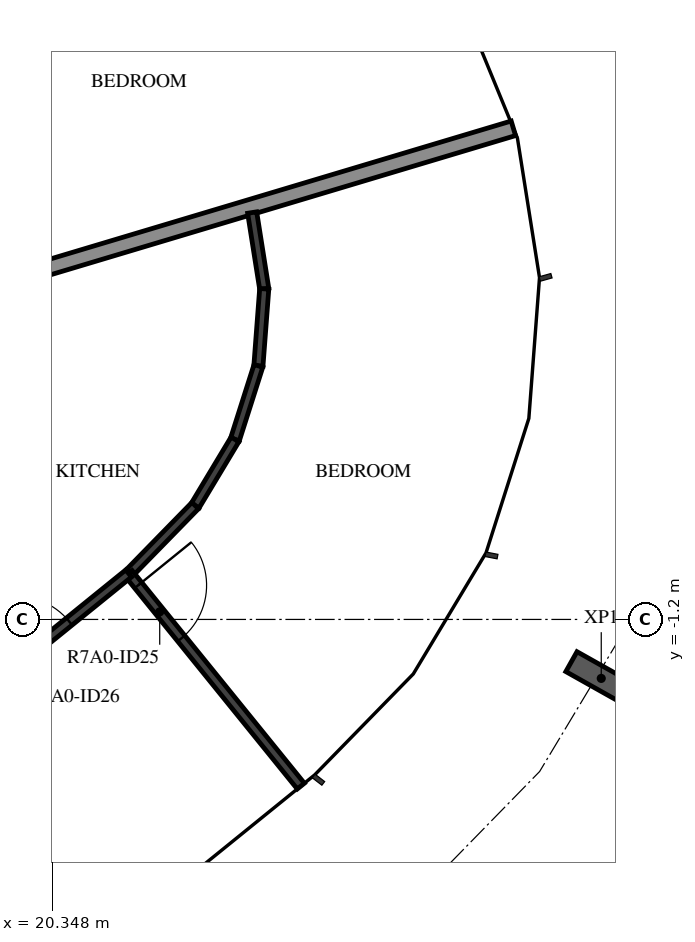
"""IFC4 building model, lengths in metres.
Left out: names, types, materials, properties, quantities, classifications, styles, units other than length and angle.
Written with IfcOpenShell. Run it as: python <this file> out.ifc"""

import sys

from ifc_helpers import new_model, si_unit, direction, frame, frame_2d, origin, origin_2d, place, context, subcontext, project, spatial, rectangle, i_section, extrude, element, fill, save


model = new_model("IFC4")
c1 = context("Model", 3, precision=1e-05, world=origin(), true_north=direction((0.0, 1.0)))
c2 = subcontext(c1, "Body", "Model", "MODEL_VIEW")
j1 = project(units=[si_unit("LENGTHUNIT", "METRE"), si_unit("PLANEANGLEUNIT", "RADIAN")], contexts=[c1])
p1 = place(None, origin())
s1 = spatial("IfcSite", under=j1, at=p1, CompositionType="ELEMENT")
p2 = place(p1, origin())
s2 = spatial("IfcBuilding", under=s1, at=p2, CompositionType="ELEMENT")
p3 = place(p2, frame((0.0, 0.0, 270.4)))
s3 = spatial("IfcBuildingStorey", under=s2, at=p3, CompositionType="ELEMENT", Elevation=270.4)
p4 = place(p3, frame((27.565, -1.976, -0.38), z_axis=(0.0, 0.0, 1.0), x_axis=(-0.489802299008, -0.871833532211, 0.0)))
e1 = element("IfcColumn", 1, at=p4, inside=s3, PredefinedType="COLUMN", context=c2, shape_type="SweptSolid", body=[
    extrude(i_section(OverallWidth=0.3, OverallDepth=0.9, WebThickness=0.019, FlangeThickness=0.035, FilletRadius=0.03, at=origin_2d()), origin(), (0.0, 0.0, 1.0), 3.5),
])
p5 = place(p3, frame((20.209, 3.405, 0.0), z_axis=(0.0, 0.0, 1.0), x_axis=(0.957991224208, 0.286797514529, 0.0)))
e2 = element("IfcWall", 2, at=p5, inside=s3, PredefinedType="STANDARD", context=c2, shape_type="SweptSolid", body=[
    extrude(rectangle(XDim=6.471, YDim=0.2, at=frame_2d((3.236, 0.0))), origin(), (0.0, 0.0, 1.0), 2.73),
])
p6 = place(p3, frame((22.972, 4.153, 0.0), z_axis=(0.0, 0.0, 1.0), x_axis=(0.156209385929, -0.987723963336, 0.0)))
e3 = element("IfcWall", 3, at=p6, inside=s3, PredefinedType="PARTITIONING", context=c2, shape_type="SweptSolid", body=[
    extrude(rectangle(XDim=1.016, YDim=0.12, at=frame_2d((0.508, 0.0))), origin(), (0.0, 0.0, 1.0), 3.12),
])
p7 = place(p3, frame((23.131, 3.149, 0.0), z_axis=(0.0, 0.0, 1.0), x_axis=(-0.075446997935, -0.99714981347, 0.0)))
e4 = element("IfcWall", 4, at=p7, inside=s3, PredefinedType="PARTITIONING", context=c2, shape_type="SweptSolid", body=[
    extrude(rectangle(XDim=1.016, YDim=0.12, at=frame_2d((0.508, 0.0))), origin(), (0.0, 0.0, 1.0), 3.12),
])
p8 = place(p3, frame((23.054, 2.136, 0.0), z_axis=(0.0, 0.0, 1.0), x_axis=(-0.303511129679, -0.952827893253, 0.0)))
e5 = element("IfcWall", 5, at=p8, inside=s3, PredefinedType="PARTITIONING", context=c2, shape_type="SweptSolid", body=[
    extrude(rectangle(XDim=1.016, YDim=0.12, at=frame_2d((0.508, 0.0))), origin(), (0.0, 0.0, 1.0), 3.12),
])
p9 = place(p3, frame((22.746, 1.168, 0.0), z_axis=(0.0, 0.0, 1.0), x_axis=(-0.515096534995, -0.857132171626, 0.0)))
e6 = element("IfcWall", 6, at=p9, inside=s3, PredefinedType="PARTITIONING", context=c2, shape_type="SweptSolid", body=[
    extrude(rectangle(XDim=1.016, YDim=0.12, at=frame_2d((0.508, 0.0))), origin(), (0.0, 0.0, 1.0), 3.12),
])
p10 = place(p3, frame((22.223, 0.298, 0.0), z_axis=(0.0, 0.0, 1.0), x_axis=(-0.69880109182, -0.715316037896, 0.0)))
e7 = element("IfcWall", 7, at=p10, inside=s3, PredefinedType="PARTITIONING", context=c2, shape_type="SweptSolid", body=[
    extrude(rectangle(XDim=1.227, YDim=0.12, at=frame_2d((0.614, 0.0))), origin(), (0.0, 0.0, 1.0), 3.12),
])
p11 = place(p3, frame((21.347, -0.595, 0.0), z_axis=(0.0, 0.0, 1.0), x_axis=(0.62934843781, -0.7771232488, 0.0)))
e8 = element("IfcWall", 8, at=p11, inside=s3, PredefinedType="PARTITIONING", context=c2, shape_type="SweptSolid", body=[
    extrude(rectangle(XDim=3.6, YDim=0.12, at=frame_2d((1.8, 0.0))), origin(), (0.0, 0.0, 1.0), 3.12),
])
p12 = place(p11, frame((0.2, 0.0, 0.0)))
e9 = element("IfcOpeningElement", 9, at=p12, cuts=e8, PredefinedType="OPENING", context=c2, shape_type="SweptSolid", body=[
    extrude(rectangle(XDim=0.9, YDim=2.1, at=frame_2d((0.45, 1.05))), frame((0.0, 0.07, 0.0), z_axis=(0.0, -1.0, 0.0), x_axis=(1.0, 0.0, 0.0)), (0.0, 0.0, 1.0), 0.14),
])
p13 = place(p3, frame((19.4, -2.172, 0.0), z_axis=(0.0, 0.0, 1.0), x_axis=(0.777147279935, 0.629318762862, 0.0)))
e10 = element("IfcWall", 10, at=p13, inside=s3, PredefinedType="PARTITIONING", context=c2, shape_type="SweptSolid", body=[
    extrude(rectangle(XDim=2.505, YDim=0.12, at=frame_2d((1.253, 0.0))), origin(), (0.0, 0.0, 1.0), 3.12),
])
p14 = place(p13, frame((0.6, 0.0, 0.0)))
e11 = element("IfcOpeningElement", 11, at=p14, cuts=e10, PredefinedType="OPENING", context=c2, shape_type="SweptSolid", body=[
    extrude(rectangle(XDim=0.9, YDim=2.1, at=frame_2d((0.45, 1.05))), frame((0.0, 0.07, 0.0), z_axis=(0.0, -1.0, 0.0), x_axis=(1.0, 0.0, 0.0)), (0.0, 0.0, 1.0), 0.14),
])
p15 = place(p12, origin())
e12 = element("IfcDoor", 12, at=p15, inside=s3, OperationType="SINGLE_SWING_RIGHT", PredefinedType="DOOR", context=c2, shape_type="SweptSolid", body=[
    extrude(rectangle(XDim=0.9, YDim=2.1, at=frame_2d((0.45, 1.05))), frame((0.0, 0.025, 0.0), z_axis=(0.0, -1.0, 0.0), x_axis=(1.0, 0.0, 0.0)), (0.0, 0.0, 1.0), 0.05),
])
fill(e9, e12)
p16 = place(p14, origin())
e13 = element("IfcDoor", 13, at=p16, inside=s3, OperationType="SINGLE_SWING_LEFT", PredefinedType="DOOR", context=c2, shape_type="SweptSolid", body=[
    extrude(rectangle(XDim=0.9, YDim=2.1, at=frame_2d((0.45, 1.05))), frame((0.0, 0.025, 0.0), z_axis=(0.0, -1.0, 0.0), x_axis=(1.0, 0.0, 0.0)), (0.0, 0.0, 1.0), 0.05),
])
fill(e11, e13)
save(model, sys.argv[1])
